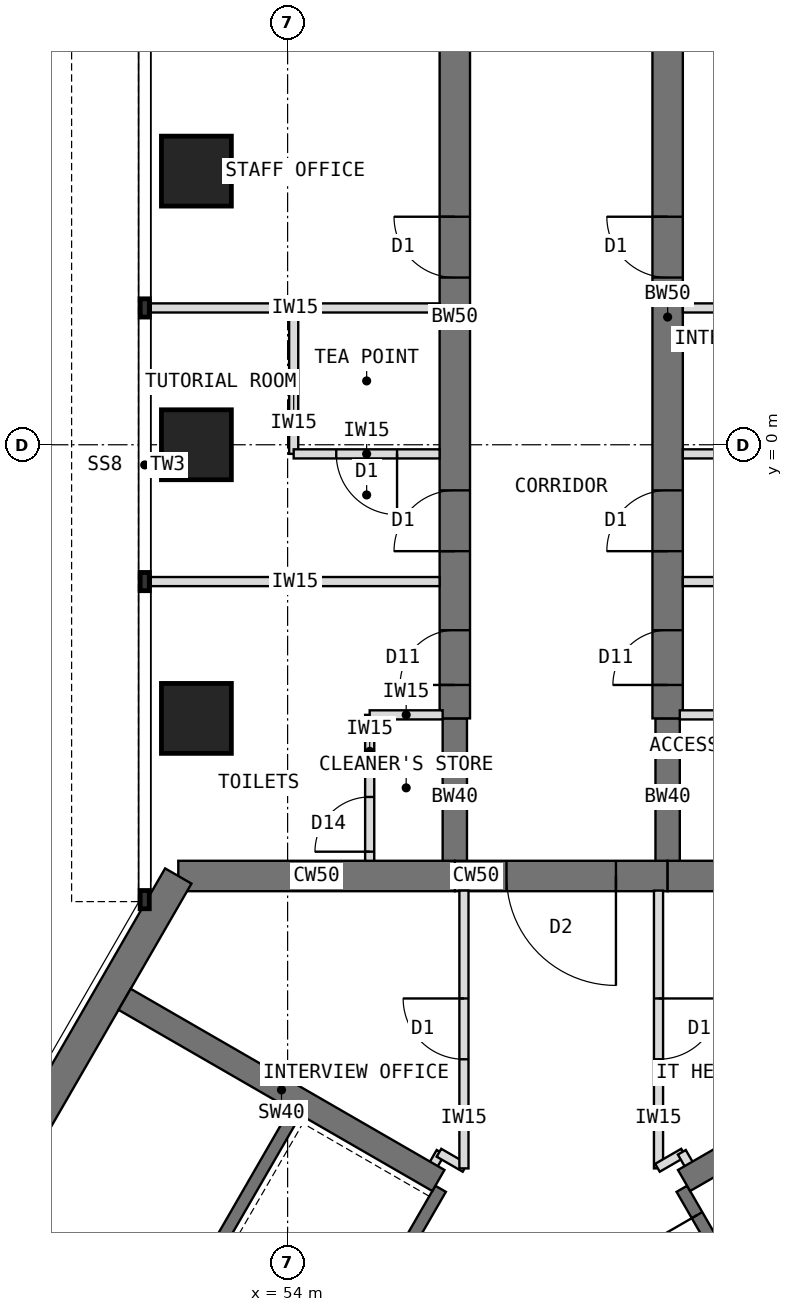
"""IFC4 building model, lengths in metres.
Left out: names, types, materials, properties, quantities, classifications, styles, units other than length and angle.
Written with IfcOpenShell. Run it as: python <this file> out.ifc"""

import sys

from ifc_helpers import new_model, si_unit, direction, frame, frame_2d, origin, origin_2d, place, context, subcontext, project, spatial, rectangle, extrude, element, fill, save


model = new_model("IFC4")
c1 = context("Model", 3, precision=1e-05, world=origin(), true_north=direction((0.0, 1.0)))
c2 = subcontext(c1, "Body", "Model", "MODEL_VIEW")
j1 = project(units=[si_unit("LENGTHUNIT", "METRE"), si_unit("PLANEANGLEUNIT", "RADIAN")], contexts=[c1])
p1 = place(None, origin())
s1 = spatial("IfcSite", under=j1, at=p1, CompositionType="ELEMENT")
p2 = place(p1, origin())
s2 = spatial("IfcBuilding", under=s1, at=p2, CompositionType="ELEMENT")
p3 = place(p2, frame((0.0, 0.0, 194.5)))
s3 = spatial("IfcBuildingStorey", under=s2, at=p3, CompositionType="ELEMENT", Elevation=194.5)
p4 = place(p3, frame((64.798, -7.092, 0.0), z_axis=(0.0, 0.0, 1.0), x_axis=(-1.0, 0.0, 0.0)))
e1 = element("IfcWall", 1, at=p4, inside=s3, PredefinedType="SHEAR", context=c2, shape_type="SweptSolid", body=[
    extrude(rectangle(XDim=4.548, YDim=0.5, at=frame_2d((2.274, 0.0))), origin(), (0.0, 0.0, 1.0), 4.0),
])
p5 = place(p3, frame((60.25, -7.092, 0.0), z_axis=(0.0, 0.0, 1.0), x_axis=(-1.0, 0.0, 0.0)))
e2 = element("IfcWall", 2, at=p5, inside=s3, PredefinedType="SHEAR", context=c2, shape_type="SweptSolid", body=[
    extrude(rectangle(XDim=3.5, YDim=0.5, at=frame_2d((1.75, 0.0))), origin(), (0.0, 0.0, 1.0), 4.0),
])
p6 = place(p5, frame((0.85, 0.0, 0.0)))
e3 = element("IfcOpeningElement", 3, at=p6, cuts=e2, PredefinedType="OPENING", context=c2, shape_type="SweptSolid", body=[
    extrude(rectangle(XDim=1.8, YDim=2.1, at=frame_2d((0.9, 1.05))), frame((0.0, 0.26, 0.0), z_axis=(0.0, -1.0, 0.0), x_axis=(1.0, 0.0, 0.0)), (0.0, 0.0, 1.0), 0.52),
])
p7 = place(p3, frame((56.75, -7.092, 0.0), z_axis=(0.0, 0.0, 1.0), x_axis=(-1.0, 0.0, 0.0)))
e4 = element("IfcWall", 4, at=p7, inside=s3, PredefinedType="SHEAR", context=c2, shape_type="SweptSolid", body=[
    extrude(rectangle(XDim=4.548, YDim=0.5, at=frame_2d((2.274, 0.0))), origin(), (0.0, 0.0, 1.0), 4.0),
])
p8 = place(p3, frame((52.202, -7.092, 0.0), z_axis=(0.0, 0.0, 1.0), x_axis=(-0.500005998175, -0.866021940709, 0.0)))
e5 = element("IfcWall", 5, at=p8, inside=s3, PredefinedType="SHEAR", context=c2, shape_type="SweptSolid", body=[
    extrude(rectangle(XDim=12.596, YDim=0.5, at=frame_2d((6.298, 0.0))), origin(), (0.0, 0.0, 1.0), 4.0),
])
p9 = place(p3, frame((56.75, -7.092, 0.0), z_axis=(0.0, 0.0, 1.0), x_axis=(0.0, 1.0, 0.0)))
e6 = element("IfcWall", 6, at=p9, inside=s3, PredefinedType="SHEAR", context=c2, shape_type="SweptSolid", body=[
    extrude(rectangle(XDim=2.592, YDim=0.4, at=frame_2d((1.296, 0.0))), origin(), (0.0, 0.0, 1.0), 4.0),
])
p10 = place(p3, frame((56.75, -4.5, 0.0), z_axis=(0.0, 0.0, 1.0), x_axis=(0.0, 1.0, 0.0)))
e7 = element("IfcWall", 7, at=p10, inside=s3, PredefinedType="SHEAR", context=c2, shape_type="SweptSolid", body=[
    extrude(rectangle(XDim=13.2, YDim=0.5, at=frame_2d((6.6, 0.0))), origin(), (0.0, 0.0, 1.0), 4.0),
])
p11 = place(p10, frame((0.55, 0.0, 0.0)))
e8 = element("IfcOpeningElement", 8, at=p11, cuts=e7, PredefinedType="OPENING", context=c2, shape_type="SweptSolid", body=[
    extrude(rectangle(XDim=0.9, YDim=2.1, at=frame_2d((0.45, 1.05))), frame((0.0, 0.26, 0.0), z_axis=(0.0, -1.0, 0.0), x_axis=(1.0, 0.0, 0.0)), (0.0, 0.0, 1.0), 0.52),
])
p12 = place(p10, frame((2.75, 0.0, 0.0)))
e9 = element("IfcOpeningElement", 9, at=p12, cuts=e7, PredefinedType="OPENING", context=c2, shape_type="SweptSolid", body=[
    extrude(rectangle(XDim=1.0, YDim=2.1, at=frame_2d((0.5, 1.05))), frame((0.0, 0.26, 0.0), z_axis=(0.0, -1.0, 0.0), x_axis=(1.0, 0.0, 0.0)), (0.0, 0.0, 1.0), 0.52),
])
p13 = place(p10, frame((7.25, 0.0, 0.0)))
e10 = element("IfcOpeningElement", 10, at=p13, cuts=e7, PredefinedType="OPENING", context=c2, shape_type="SweptSolid", body=[
    extrude(rectangle(XDim=1.0, YDim=2.1, at=frame_2d((0.5, 1.05))), frame((0.0, 0.26, 0.0), z_axis=(0.0, -1.0, 0.0), x_axis=(1.0, 0.0, 0.0)), (0.0, 0.0, 1.0), 0.52),
])
p14 = place(p3, frame((60.25, -7.092, 0.0), z_axis=(0.0, 0.0, 1.0), x_axis=(0.0, 1.0, 0.0)))
e11 = element("IfcWall", 11, at=p14, inside=s3, PredefinedType="SHEAR", context=c2, shape_type="SweptSolid", body=[
    extrude(rectangle(XDim=2.592, YDim=0.4, at=frame_2d((1.296, 0.0))), origin(), (0.0, 0.0, 1.0), 4.0),
])
p15 = place(p3, frame((60.25, -4.5, 0.0), z_axis=(0.0, 0.0, 1.0), x_axis=(0.0, 1.0, 0.0)))
e12 = element("IfcWall", 12, at=p15, inside=s3, PredefinedType="SHEAR", context=c2, shape_type="SweptSolid", body=[
    extrude(rectangle(XDim=13.2, YDim=0.5, at=frame_2d((6.6, 0.0))), origin(), (0.0, 0.0, 1.0), 4.0),
])
p16 = place(p15, frame((0.55, 0.0, 0.0)))
e13 = element("IfcOpeningElement", 13, at=p16, cuts=e12, PredefinedType="OPENING", context=c2, shape_type="SweptSolid", body=[
    extrude(rectangle(XDim=0.9, YDim=2.1, at=frame_2d((0.45, 1.05))), frame((0.0, 0.26, 0.0), z_axis=(0.0, -1.0, 0.0), x_axis=(1.0, 0.0, 0.0)), (0.0, 0.0, 1.0), 0.52),
])
p17 = place(p15, frame((2.75, 0.0, 0.0)))
e14 = element("IfcOpeningElement", 14, at=p17, cuts=e12, PredefinedType="OPENING", context=c2, shape_type="SweptSolid", body=[
    extrude(rectangle(XDim=1.0, YDim=2.1, at=frame_2d((0.5, 1.05))), frame((0.0, 0.26, 0.0), z_axis=(0.0, -1.0, 0.0), x_axis=(1.0, 0.0, 0.0)), (0.0, 0.0, 1.0), 0.52),
])
p18 = place(p15, frame((7.25, 0.0, 0.0)))
e15 = element("IfcOpeningElement", 15, at=p18, cuts=e12, PredefinedType="OPENING", context=c2, shape_type="SweptSolid", body=[
    extrude(rectangle(XDim=1.0, YDim=2.1, at=frame_2d((0.5, 1.05))), frame((0.0, 0.26, 0.0), z_axis=(0.0, -1.0, 0.0), x_axis=(1.0, 0.0, 0.0)), (0.0, 0.0, 1.0), 0.52),
])
for number, where, z_axis, x_axis in (
    (16, (52.5, -4.5, 0.0), (0.0, 0.0, 1.0), (1.0, 0.0, 0.0)),
    (17, (52.5, 0.0, 0.0), (0.0, 0.0, 1.0), (1.0, 0.0, 0.0)),
    (18, (52.5, 4.5, 0.0), (0.0, 0.0, 1.0), (1.0, 0.0, 0.0)),
):
    element("IfcColumn", number, at=place(p3, frame(where, z_axis=z_axis, x_axis=x_axis)), inside=s3, PredefinedType="COLUMN", context=c2, shape_type="SweptSolid", body=[
        extrude(rectangle(XDim=1.15, YDim=1.15, at=origin_2d()), origin(), (0.0, 0.0, 1.0), 4.0),
    ])
p19 = place(p3, frame((56.516, -12.236, 0.0), z_axis=(0.0, 0.0, 1.0), x_axis=(-0.49999894854, -0.866026010844, 0.0)))
e19 = element("IfcWall", 19, at=p19, inside=s3, PredefinedType="SHEAR", context=c2, shape_type="SweptSolid", body=[
    extrude(rectangle(XDim=8.0, YDim=0.2, at=frame_2d((4.0, 0.0))), origin(), (0.0, 0.0, 1.0), 4.0),
])
p20 = place(p19, frame((6.3, 0.0, 0.0)))
e20 = element("IfcOpeningElement", 20, at=p20, cuts=e19, PredefinedType="OPENING", context=c2, shape_type="SweptSolid", body=[
    extrude(rectangle(XDim=1.2, YDim=2.1, at=frame_2d((0.6, 1.05))), frame((0.0, 0.11, 0.0), z_axis=(0.0, -1.0, 0.0), x_axis=(1.0, 0.0, 0.0)), (0.0, 0.0, 1.0), 0.22),
])
p21 = place(p3, frame((54.178, -10.886, 0.0), z_axis=(0.0, 0.0, 1.0), x_axis=(-0.49999894854, -0.866026010844, 0.0)))
e21 = element("IfcWall", 21, at=p21, inside=s3, PredefinedType="SHEAR", context=c2, shape_type="SweptSolid", body=[
    extrude(rectangle(XDim=8.0, YDim=0.2, at=frame_2d((4.0, 0.0))), origin(), (0.0, 0.0, 1.0), 4.0),
])
p22 = place(p21, frame((6.8, 0.0, 0.0)))
e22 = element("IfcOpeningElement", 22, at=p22, cuts=e21, PredefinedType="OPENING", context=c2, shape_type="SweptSolid", body=[
    extrude(rectangle(XDim=0.9, YDim=2.1, at=frame_2d((0.45, 1.05))), frame((0.0, 0.11, 0.0), z_axis=(0.0, -1.0, 0.0), x_axis=(1.0, 0.0, 0.0)), (0.0, 0.0, 1.0), 0.22),
])
p23 = place(p3, frame((56.48, -12.099, 0.0), z_axis=(0.0, 0.0, 1.0), x_axis=(-0.86602319114, 0.500003832394, 0.0)))
e23 = element("IfcWall", 23, at=p23, inside=s3, PredefinedType="SHEAR", context=c2, shape_type="SweptSolid", body=[
    extrude(rectangle(XDim=5.958, YDim=0.4, at=frame_2d((2.979, 0.0))), origin(), (0.0, 0.0, 1.0), 4.0),
])
p24 = place(p3, frame((64.484, -19.164, 0.0), z_axis=(0.0, 0.0, 1.0), x_axis=(-0.49999894854, 0.866026010844, 0.0)))
e24 = element("IfcWall", 24, at=p24, inside=s3, PredefinedType="SHEAR", context=c2, shape_type="SweptSolid", body=[
    extrude(rectangle(XDim=8.0, YDim=0.2, at=frame_2d((4.0, 0.0))), origin(), (0.0, 0.0, 1.0), 4.0),
])
p25 = place(p24, frame((6.3, 0.0, 0.0)))
e25 = element("IfcOpeningElement", 25, at=p25, cuts=e24, PredefinedType="OPENING", context=c2, shape_type="SweptSolid", body=[
    extrude(rectangle(XDim=1.2, YDim=2.1, at=frame_2d((0.6, 1.05))), frame((0.0, 0.11, 0.0), z_axis=(0.0, -1.0, 0.0), x_axis=(1.0, 0.0, 0.0)), (0.0, 0.0, 1.0), 0.22),
])
p26 = place(p24, frame((0.9, 0.0, 0.0)))
e26 = element("IfcOpeningElement", 26, at=p26, cuts=e24, PredefinedType="OPENING", context=c2, shape_type="SweptSolid", body=[
    extrude(rectangle(XDim=1.1, YDim=2.2, at=frame_2d((0.55, 1.1))), frame((0.0, 0.11, 0.0), z_axis=(0.0, -1.0, 0.0), x_axis=(1.0, 0.0, 0.0)), (0.0, 0.0, 1.0), 0.22),
])
p27 = place(p24, frame((3.8, 0.0, 0.0)))
e27 = element("IfcOpeningElement", 27, at=p27, cuts=e24, PredefinedType="OPENING", context=c2, shape_type="SweptSolid", body=[
    extrude(rectangle(XDim=1.1, YDim=2.2, at=frame_2d((0.55, 1.1))), frame((0.0, 0.11, 0.0), z_axis=(0.0, -1.0, 0.0), x_axis=(1.0, 0.0, 0.0)), (0.0, 0.0, 1.0), 0.22),
])
p28 = place(p3, frame((60.52, -12.099, 0.0), z_axis=(0.0, 0.0, 1.0), x_axis=(0.86602319114, 0.500003832394, 0.0)))
e28 = element("IfcWall", 28, at=p28, inside=s3, PredefinedType="SHEAR", context=c2, shape_type="SweptSolid", body=[
    extrude(rectangle(XDim=5.958, YDim=0.4, at=frame_2d((2.979, 0.0))), origin(), (0.0, 0.0, 1.0), 4.0),
])
for number, where, z_axis, x_axis in (
    (29, (56.5, -2.25, 0.0), (0.0, 0.0, 1.0), (-1.0, 0.0, 0.0)),
    (30, (56.5, 2.25, 0.0), (0.0, 0.0, 1.0), (-1.0, 0.0, 0.0)),
):
    element("IfcWall", number, at=place(p3, frame(where, z_axis=z_axis, x_axis=x_axis)), inside=s3, PredefinedType="PARTITIONING", context=c2, shape_type="SweptSolid", body=[
        extrude(rectangle(XDim=4.75, YDim=0.15, at=frame_2d((2.375, 0.0))), origin(), (0.0, 0.0, 1.0), 3.8),
    ])
p29 = place(p3, frame((54.1, -0.15, 0.0), z_axis=(0.0, 0.0, 1.0), x_axis=(0.0, 1.0, 0.0)))
e31 = element("IfcWall", 31, at=p29, inside=s3, PredefinedType="PARTITIONING", context=c2, shape_type="SweptSolid", body=[
    extrude(rectangle(XDim=2.4, YDim=0.15, at=frame_2d((1.2, 0.0))), origin(), (0.0, 0.0, 1.0), 3.8),
])
p30 = place(p3, frame((56.5, -0.15, 0.0), z_axis=(0.0, 0.0, 1.0), x_axis=(-1.0, 0.0, 0.0)))
e32 = element("IfcWall", 32, at=p30, inside=s3, PredefinedType="PARTITIONING", context=c2, shape_type="SweptSolid", body=[
    extrude(rectangle(XDim=2.4, YDim=0.15, at=frame_2d((1.2, 0.0))), origin(), (0.0, 0.0, 1.0), 3.8),
])
p31 = place(p30, frame((0.7, 0.0, 0.0)))
e33 = element("IfcOpeningElement", 33, at=p31, cuts=e32, PredefinedType="OPENING", context=c2, shape_type="SweptSolid", body=[
    extrude(rectangle(XDim=1.0, YDim=2.1, at=frame_2d((0.5, 1.05))), frame((0.0, 0.085, 0.0), z_axis=(0.0, -1.0, 0.0), x_axis=(1.0, 0.0, 0.0)), (0.0, 0.0, 1.0), 0.17),
])
p32 = place(p3, frame((55.35, -6.842, 0.0), z_axis=(0.0, 0.0, 1.0), x_axis=(0.0, 1.0, 0.0)))
e34 = element("IfcWall", 34, at=p32, inside=s3, PredefinedType="PARTITIONING", context=c2, shape_type="SweptSolid", body=[
    extrude(rectangle(XDim=2.4, YDim=0.15, at=frame_2d((1.2, 0.0))), origin(), (0.0, 0.0, 1.0), 3.8),
])
p33 = place(p32, frame((0.15, 0.0, 0.0)))
e35 = element("IfcOpeningElement", 35, at=p33, cuts=e34, PredefinedType="OPENING", context=c2, shape_type="SweptSolid", body=[
    extrude(rectangle(XDim=0.9, YDim=2.1, at=frame_2d((0.45, 1.05))), frame((0.0, 0.085, 0.0), z_axis=(0.0, -1.0, 0.0), x_axis=(1.0, 0.0, 0.0)), (0.0, 0.0, 1.0), 0.17),
])
p34 = place(p3, frame((56.55, -4.442, 0.0), z_axis=(0.0, 0.0, 1.0), x_axis=(-1.0, 0.0, 0.0)))
e36 = element("IfcWall", 36, at=p34, inside=s3, PredefinedType="PARTITIONING", context=c2, shape_type="SweptSolid", body=[
    extrude(rectangle(XDim=1.2, YDim=0.15, at=frame_2d((0.6, 0.0))), origin(), (0.0, 0.0, 1.0), 3.267),
])
for number, where, z_axis, x_axis in (
    (37, (60.5, -2.25, 0.0), (0.0, 0.0, 1.0), (1.0, 0.0, 0.0)),
    (38, (60.5, 2.25, 0.0), (0.0, 0.0, 1.0), (1.0, 0.0, 0.0)),
):
    element("IfcWall", number, at=place(p3, frame(where, z_axis=z_axis, x_axis=x_axis)), inside=s3, PredefinedType="PARTITIONING", context=c2, shape_type="SweptSolid", body=[
        extrude(rectangle(XDim=4.75, YDim=0.15, at=frame_2d((2.375, 0.0))), origin(), (0.0, 0.0, 1.0), 3.8),
    ])
p35 = place(p3, frame((60.5, -0.15, 0.0), z_axis=(0.0, 0.0, 1.0), x_axis=(1.0, 0.0, 0.0)))
e39 = element("IfcWall", 39, at=p35, inside=s3, PredefinedType="PARTITIONING", context=c2, shape_type="SweptSolid", body=[
    extrude(rectangle(XDim=2.4, YDim=0.15, at=frame_2d((1.2, 0.0))), origin(), (0.0, 0.0, 1.0), 3.8),
])
p36 = place(p35, frame((0.7, 0.0, 0.0)))
e40 = element("IfcOpeningElement", 40, at=p36, cuts=e39, PredefinedType="OPENING", context=c2, shape_type="SweptSolid", body=[
    extrude(rectangle(XDim=1.0, YDim=2.1, at=frame_2d((0.5, 1.05))), frame((0.0, 0.085, 0.0), z_axis=(0.0, -1.0, 0.0), x_axis=(1.0, 0.0, 0.0)), (0.0, 0.0, 1.0), 0.17),
])
p37 = place(p3, frame((60.45, -4.442, 0.0), z_axis=(0.0, 0.0, 1.0), x_axis=(1.0, 0.0, 0.0)))
e41 = element("IfcWall", 41, at=p37, inside=s3, PredefinedType="PARTITIONING", context=c2, shape_type="SweptSolid", body=[
    extrude(rectangle(XDim=3.2, YDim=0.15, at=frame_2d((1.6, 0.0))), origin(), (0.0, 0.0, 1.0), 3.267),
])
p38 = place(p3, frame((56.302, -12.008, 0.0), z_axis=(0.0, 0.0, 1.0), x_axis=(0.500230298122, 0.865892400268, 0.0)))
e42 = element("IfcWall", 42, at=p38, inside=s3, PredefinedType="PARTITIONING", context=c2, shape_type="SweptSolid", body=[
    extrude(rectangle(XDim=0.43, YDim=0.15, at=frame_2d((0.215, 0.0))), origin(), (0.0, 0.0, 1.0), 3.8),
])
p39 = place(p3, frame((56.489, -11.643, 0.0), z_axis=(0.0, 0.0, 1.0), x_axis=(0.865831790172, -0.50033519877, 0.0)))
e43 = element("IfcWall", 43, at=p39, inside=s3, PredefinedType="PARTITIONING", context=c2, shape_type="SweptSolid", body=[
    extrude(rectangle(XDim=0.494, YDim=0.15, at=frame_2d((0.247, 0.0))), origin(), (0.0, 0.0, 1.0), 3.8),
])
p40 = place(p3, frame((56.9, -11.9, 0.0), z_axis=(0.0, 0.0, 1.0), x_axis=(0.0, 1.0, 0.0)))
e44 = element("IfcWall", 44, at=p40, inside=s3, PredefinedType="PARTITIONING", context=c2, shape_type="SweptSolid", body=[
    extrude(rectangle(XDim=4.568, YDim=0.15, at=frame_2d((2.284, 0.0))), origin(), (0.0, 0.0, 1.0), 3.8),
])
p41 = place(p40, frame((1.794, 0.0, 0.0)))
e45 = element("IfcOpeningElement", 45, at=p41, cuts=e44, PredefinedType="OPENING", context=c2, shape_type="SweptSolid", body=[
    extrude(rectangle(XDim=1.0, YDim=2.1, at=frame_2d((0.5, 1.05))), frame((0.0, 0.085, 0.0), z_axis=(0.0, -1.0, 0.0), x_axis=(1.0, 0.0, 0.0)), (0.0, 0.0, 1.0), 0.17),
])
p42 = place(p3, frame((60.1, -7.332, 0.0), z_axis=(0.0, 0.0, 1.0), x_axis=(0.0, -1.0, 0.0)))
e46 = element("IfcWall", 46, at=p42, inside=s3, PredefinedType="PARTITIONING", context=c2, shape_type="SweptSolid", body=[
    extrude(rectangle(XDim=4.568, YDim=0.15, at=frame_2d((2.284, 0.0))), origin(), (0.0, 0.0, 1.0), 3.8),
])
p43 = place(p42, frame((1.774, 0.0, 0.0)))
e47 = element("IfcOpeningElement", 47, at=p43, cuts=e46, PredefinedType="OPENING", context=c2, shape_type="SweptSolid", body=[
    extrude(rectangle(XDim=1.0, YDim=2.1, at=frame_2d((0.5, 1.05))), frame((0.0, 0.085, 0.0), z_axis=(0.0, -1.0, 0.0), x_axis=(1.0, 0.0, 0.0)), (0.0, 0.0, 1.0), 0.17),
])
p44 = place(p3, frame((60.083, -11.89, 0.0), z_axis=(0.0, 0.0, 1.0), x_axis=(0.865831790172, 0.50033519877, 0.0)))
e48 = element("IfcWall", 48, at=p44, inside=s3, PredefinedType="PARTITIONING", context=c2, shape_type="SweptSolid", body=[
    extrude(rectangle(XDim=0.494, YDim=0.15, at=frame_2d((0.247, 0.0))), origin(), (0.0, 0.0, 1.0), 3.8),
])
p45 = place(p3, frame((60.483, -11.635, 0.0), z_axis=(0.0, 0.0, 1.0), x_axis=(0.500230298122, -0.865892400268, 0.0)))
e49 = element("IfcWall", 49, at=p45, inside=s3, PredefinedType="PARTITIONING", context=c2, shape_type="SweptSolid", body=[
    extrude(rectangle(XDim=0.43, YDim=0.15, at=frame_2d((0.215, 0.0))), origin(), (0.0, 0.0, 1.0), 3.8),
])
p46 = place(p25, origin())
e50 = element("IfcDoor", 50, at=p46, inside=s3, OperationType="SINGLE_SWING_RIGHT", PredefinedType="DOOR", context=c2, shape_type="SweptSolid", body=[
    extrude(rectangle(XDim=1.2, YDim=2.1, at=frame_2d((0.6, 1.05))), frame((0.0, 0.025, 0.0), z_axis=(0.0, -1.0, 0.0), x_axis=(1.0, 0.0, 0.0)), (0.0, 0.0, 1.0), 0.05),
])
fill(e25, e50)
p47 = place(p6, origin())
e51 = element("IfcDoor", 51, at=p47, inside=s3, OperationType="DOUBLE_DOOR_DOUBLE_SWING", PredefinedType="DOOR", context=c2, shape_type="SweptSolid", body=[
    extrude(rectangle(XDim=1.8, YDim=2.1, at=frame_2d((0.9, 1.05))), frame((0.0, 0.025, 0.0), z_axis=(0.0, -1.0, 0.0), x_axis=(1.0, 0.0, 0.0)), (0.0, 0.0, 1.0), 0.05),
])
fill(e3, e51)
p48 = place(p31, origin())
e52 = element("IfcDoor", 52, at=p48, inside=s3, OperationType="SINGLE_SWING_LEFT", PredefinedType="DOOR", context=c2, shape_type="SweptSolid", body=[
    extrude(rectangle(XDim=1.0, YDim=2.1, at=frame_2d((0.5, 1.05))), frame((0.0, 0.025, 0.0), z_axis=(0.0, -1.0, 0.0), x_axis=(1.0, 0.0, 0.0)), (0.0, 0.0, 1.0), 0.05),
])
fill(e33, e52)
p49 = place(p33, origin())
e53 = element("IfcDoor", 53, at=p49, inside=s3, OperationType="SINGLE_SWING_LEFT", PredefinedType="DOOR", context=c2, shape_type="SweptSolid", body=[
    extrude(rectangle(XDim=0.9, YDim=2.1, at=frame_2d((0.45, 1.05))), frame((0.0, 0.025, 0.0), z_axis=(0.0, -1.0, 0.0), x_axis=(1.0, 0.0, 0.0)), (0.0, 0.0, 1.0), 0.05),
])
fill(e35, e53)
p50 = place(p43, origin())
e54 = element("IfcDoor", 54, at=p50, inside=s3, OperationType="SINGLE_SWING_LEFT", PredefinedType="DOOR", context=c2, shape_type="SweptSolid", body=[
    extrude(rectangle(XDim=1.0, YDim=2.1, at=frame_2d((0.5, 1.05))), frame((0.0, 0.025, 0.0), z_axis=(0.0, -1.0, 0.0), x_axis=(1.0, 0.0, 0.0)), (0.0, 0.0, 1.0), 0.05),
])
fill(e47, e54)
p51 = place(p41, origin())
e55 = element("IfcDoor", 55, at=p51, inside=s3, OperationType="SINGLE_SWING_RIGHT", PredefinedType="DOOR", context=c2, shape_type="SweptSolid", body=[
    extrude(rectangle(XDim=1.0, YDim=2.1, at=frame_2d((0.5, 1.05))), frame((0.0, 0.025, 0.0), z_axis=(0.0, -1.0, 0.0), x_axis=(1.0, 0.0, 0.0)), (0.0, 0.0, 1.0), 0.05),
])
fill(e45, e55)
p52 = place(p11, origin())
e56 = element("IfcDoor", 56, at=p52, inside=s3, OperationType="SINGLE_SWING_LEFT", PredefinedType="DOOR", context=c2, shape_type="SweptSolid", body=[
    extrude(rectangle(XDim=0.9, YDim=2.1, at=frame_2d((0.45, 1.05))), frame((0.0, 0.025, 0.0), z_axis=(0.0, -1.0, 0.0), x_axis=(1.0, 0.0, 0.0)), (0.0, 0.0, 1.0), 0.05),
])
fill(e8, e56)
p53 = place(p12, origin())
e57 = element("IfcDoor", 57, at=p53, inside=s3, OperationType="SINGLE_SWING_LEFT", PredefinedType="DOOR", context=c2, shape_type="SweptSolid", body=[
    extrude(rectangle(XDim=1.0, YDim=2.1, at=frame_2d((0.5, 1.05))), frame((0.0, 0.025, 0.0), z_axis=(0.0, -1.0, 0.0), x_axis=(1.0, 0.0, 0.0)), (0.0, 0.0, 1.0), 0.05),
])
fill(e9, e57)
p54 = place(p13, origin())
e58 = element("IfcDoor", 58, at=p54, inside=s3, OperationType="SINGLE_SWING_RIGHT", PredefinedType="DOOR", context=c2, shape_type="SweptSolid", body=[
    extrude(rectangle(XDim=1.0, YDim=2.1, at=frame_2d((0.5, 1.05))), frame((0.0, 0.025, 0.0), z_axis=(0.0, -1.0, 0.0), x_axis=(1.0, 0.0, 0.0)), (0.0, 0.0, 1.0), 0.05),
])
fill(e10, e58)
p55 = place(p16, origin())
e59 = element("IfcDoor", 59, at=p55, inside=s3, OperationType="SINGLE_SWING_LEFT", PredefinedType="DOOR", context=c2, shape_type="SweptSolid", body=[
    extrude(rectangle(XDim=0.9, YDim=2.1, at=frame_2d((0.45, 1.05))), frame((0.0, 0.025, 0.0), z_axis=(0.0, -1.0, 0.0), x_axis=(1.0, 0.0, 0.0)), (0.0, 0.0, 1.0), 0.05),
])
fill(e13, e59)
p56 = place(p17, origin())
e60 = element("IfcDoor", 60, at=p56, inside=s3, OperationType="SINGLE_SWING_LEFT", PredefinedType="DOOR", context=c2, shape_type="SweptSolid", body=[
    extrude(rectangle(XDim=1.0, YDim=2.1, at=frame_2d((0.5, 1.05))), frame((0.0, 0.025, 0.0), z_axis=(0.0, -1.0, 0.0), x_axis=(1.0, 0.0, 0.0)), (0.0, 0.0, 1.0), 0.05),
])
fill(e14, e60)
p57 = place(p18, origin())
e61 = element("IfcDoor", 61, at=p57, inside=s3, OperationType="SINGLE_SWING_RIGHT", PredefinedType="DOOR", context=c2, shape_type="SweptSolid", body=[
    extrude(rectangle(XDim=1.0, YDim=2.1, at=frame_2d((0.5, 1.05))), frame((0.0, 0.025, 0.0), z_axis=(0.0, -1.0, 0.0), x_axis=(1.0, 0.0, 0.0)), (0.0, 0.0, 1.0), 0.05),
])
fill(e15, e61)
save(model, sys.argv[1])
